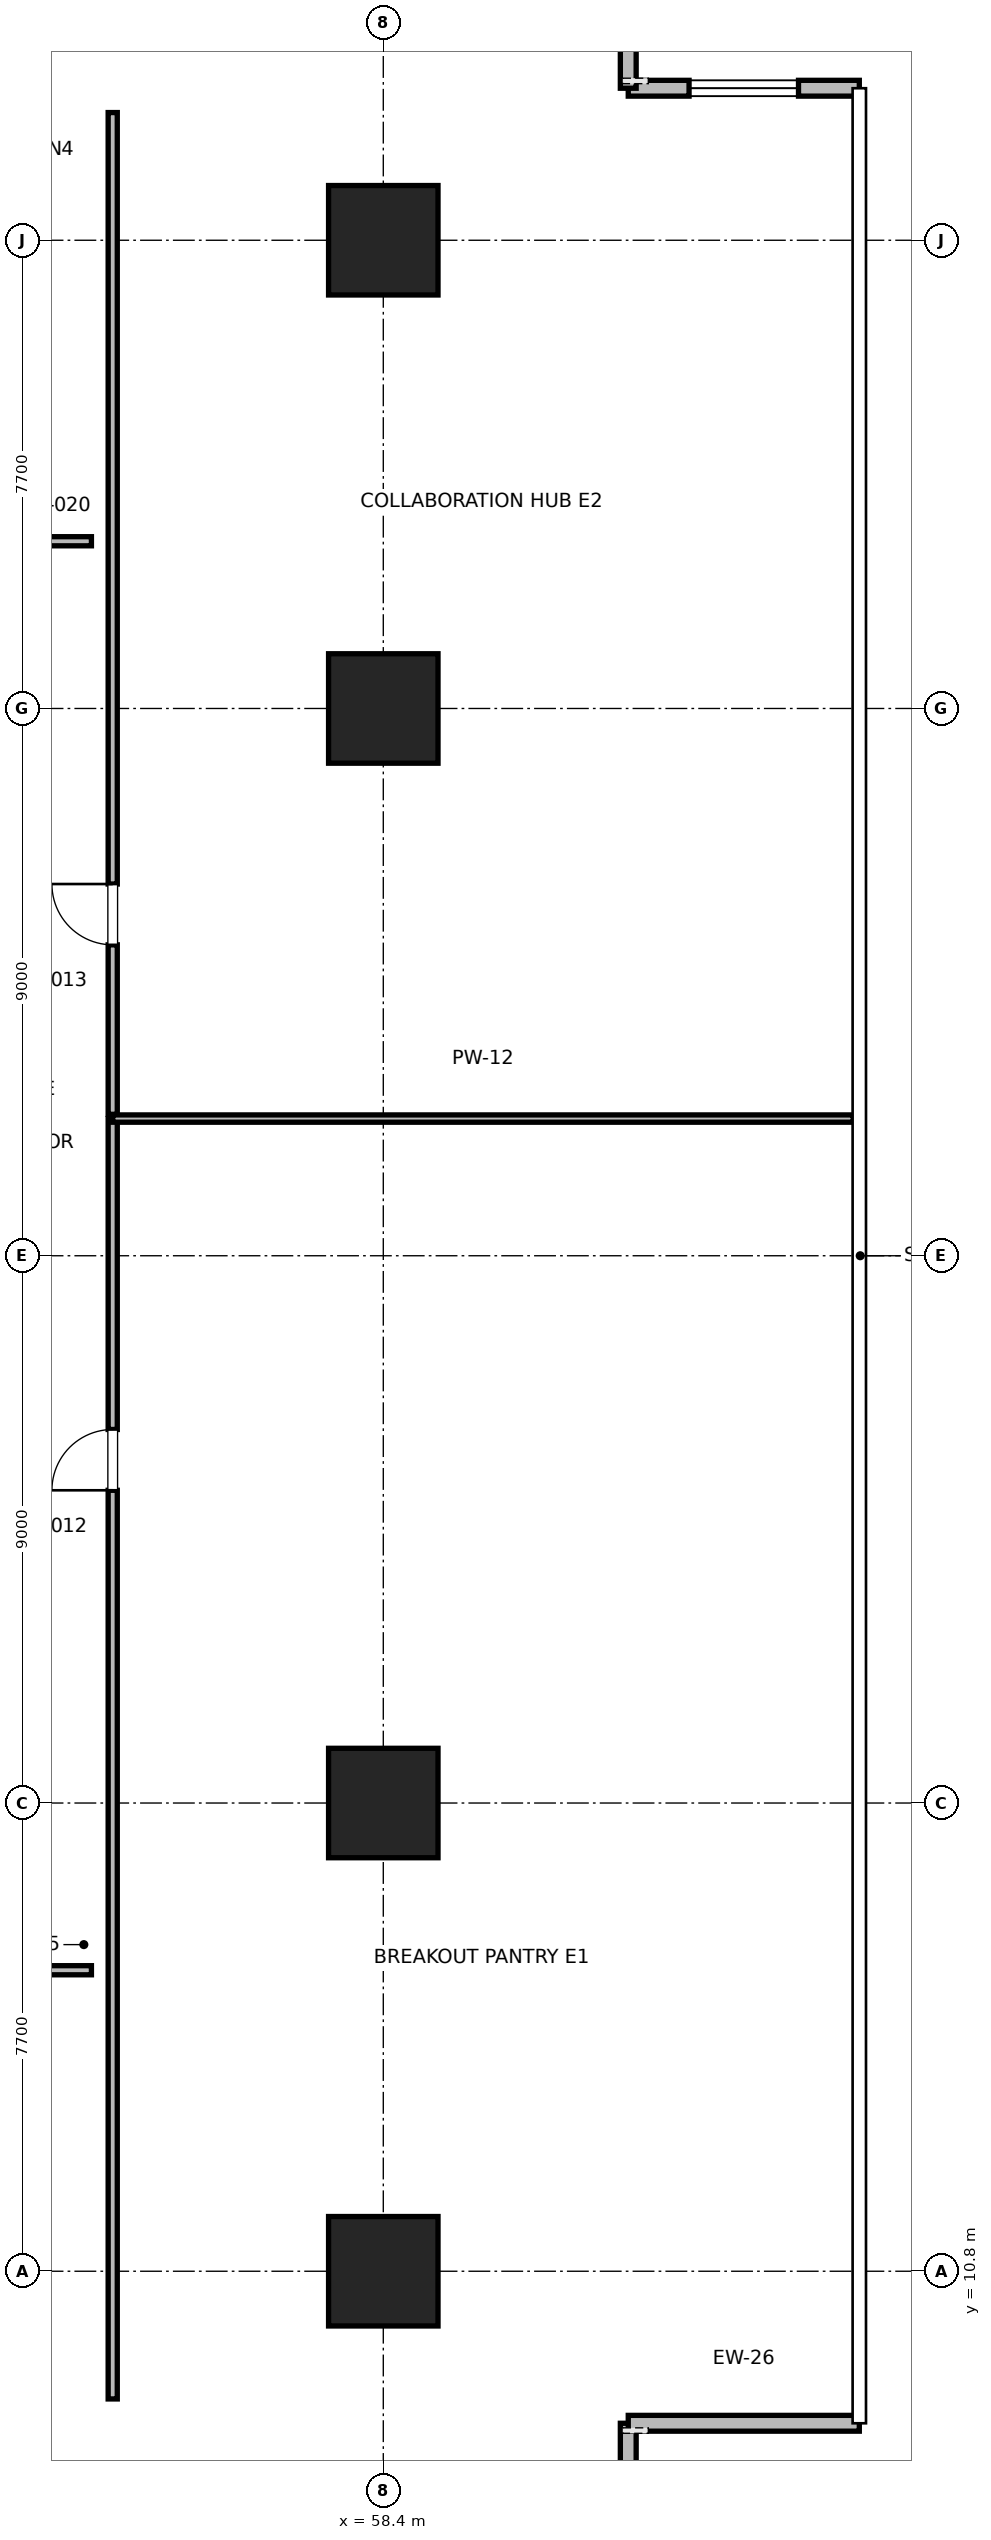
"""IFC4 building model, lengths in metres.
Left out: names, types, materials, properties, quantities, classifications, styles, units other than length and angle.
Written with IfcOpenShell. Run it as: python <this file> out.ifc"""

import sys

from ifc_helpers import new_model, si_unit, direction, frame, frame_2d, origin, origin_2d, place, context, subcontext, project, spatial, rectangle, extrude, element, fill, save


model = new_model("IFC4")
c1 = context("Model", 3, precision=1e-05, world=origin(), true_north=direction((0.0, 1.0)))
c2 = subcontext(c1, "Body", "Model", "MODEL_VIEW")
j1 = project(units=[si_unit("LENGTHUNIT", "METRE"), si_unit("PLANEANGLEUNIT", "RADIAN")], contexts=[c1])
p1 = place(None, origin())
s1 = spatial("IfcSite", under=j1, at=p1, CompositionType="ELEMENT")
p2 = place(p1, origin())
s2 = spatial("IfcBuilding", under=s1, at=p2, CompositionType="ELEMENT")
p3 = place(p2, frame((0.0, 0.0, 79.6)))
s3 = spatial("IfcBuildingStorey", under=s2, at=p3, CompositionType="ELEMENT", Elevation=79.6)
for number, where, z_axis, x_axis in (
    (1, (58.4, 18.5, 0.0), (0.0, 0.0, 1.0), (1.0, 0.0, 0.0)),
    (2, (58.4, 36.5, 0.0), (0.0, 0.0, 1.0), (1.0, 0.0, 0.0)),
    (3, (58.4, 10.8, 0.0), (0.0, 0.0, 1.0), (1.0, 0.0, 0.0)),
    (4, (58.4, 44.2, 0.0), (0.0, 0.0, 1.0), (1.0, 0.0, 0.0)),
):
    element("IfcColumn", number, at=place(p3, frame(where, z_axis=z_axis, x_axis=x_axis)), inside=s3, PredefinedType="COLUMN", context=c2, shape_type="SweptSolid", body=[
        extrude(rectangle(XDim=1.8, YDim=1.8, at=origin_2d()), origin(), (0.0, 0.0, 1.0), 4.0),
    ])
p4 = place(p3, frame((62.429, 4.9, 0.0), z_axis=(0.0, 0.0, 1.0), x_axis=(0.0, 1.0, 0.0)))
e5 = element("IfcWall", 5, at=p4, inside=s3, PredefinedType="PARAPET", context=c2, shape_type="SweptSolid", body=[
    extrude(rectangle(XDim=3.4, YDim=0.26, at=frame_2d((1.7, 0.0))), origin(), (0.0, 0.0, 1.0), 3.76),
])
p5 = place(p4, frame((0.8, 0.0, 0.85)))
e6 = element("IfcOpeningElement", 6, at=p5, cuts=e5, PredefinedType="OPENING", context=c2, shape_type="SweptSolid", body=[
    extrude(rectangle(XDim=1.8, YDim=2.2, at=frame_2d((0.9, 1.1))), frame((0.0, 0.13, 0.0), z_axis=(0.0, -1.0, 0.0), x_axis=(1.0, 0.0, 0.0)), (0.0, 0.0, 1.0), 0.26),
])
p6 = place(p3, frame((62.429, 8.3, 0.0), z_axis=(0.0, 0.0, 1.0), x_axis=(1.0, 0.0, 0.0)))
e7 = element("IfcWall", 7, at=p6, inside=s3, PredefinedType="PARAPET", context=c2, shape_type="SweptSolid", body=[
    extrude(rectangle(XDim=3.8, YDim=0.26, at=frame_2d((1.9, 0.0))), origin(), (0.0, 0.0, 1.0), 3.76),
])
p7 = place(p3, frame((66.229, 46.7, 0.0), z_axis=(0.0, 0.0, 1.0), x_axis=(-1.0, 0.0, 0.0)))
e8 = element("IfcWall", 8, at=p7, inside=s3, PredefinedType="PARAPET", context=c2, shape_type="SweptSolid", body=[
    extrude(rectangle(XDim=3.8, YDim=0.26, at=frame_2d((1.9, 0.0))), origin(), (0.0, 0.0, 1.0), 3.76),
])
p8 = place(p7, frame((1.0, 0.0, 0.85)))
e9 = element("IfcOpeningElement", 9, at=p8, cuts=e8, PredefinedType="OPENING", context=c2, shape_type="SweptSolid", body=[
    extrude(rectangle(XDim=1.8, YDim=2.2, at=frame_2d((0.9, 1.1))), frame((0.0, 0.13, 0.0), z_axis=(0.0, -1.0, 0.0), x_axis=(1.0, 0.0, 0.0)), (0.0, 0.0, 1.0), 0.26),
])
p9 = place(p3, frame((62.429, 46.7, 0.0), z_axis=(0.0, 0.0, 1.0), x_axis=(0.0, 1.0, 0.0)))
e10 = element("IfcWall", 10, at=p9, inside=s3, PredefinedType="PARAPET", context=c2, shape_type="SweptSolid", body=[
    extrude(rectangle(XDim=3.4, YDim=0.26, at=frame_2d((1.7, 0.0))), origin(), (0.0, 0.0, 1.0), 3.76),
])
p10 = place(p3, frame((47.686, 39.25, 0.0), z_axis=(0.0, 0.0, 1.0), x_axis=(1.0, 0.0, 0.0)))
e11 = element("IfcWall", 11, at=p10, inside=s3, PredefinedType="PARTITIONING", context=c2, shape_type="SweptSolid", body=[
    extrude(rectangle(XDim=5.914, YDim=0.15, at=frame_2d((2.957, 0.0))), origin(), (0.0, 0.0, 1.0), 2.85),
])
p11 = place(p10, frame((2.407, 0.0, 0.0)))
e12 = element("IfcOpeningElement", 12, at=p11, cuts=e11, PredefinedType="OPENING", context=c2, shape_type="SweptSolid", body=[
    extrude(rectangle(XDim=1.0, YDim=2.15, at=frame_2d((0.5, 1.075))), frame((0.0, 0.075, 0.0), z_axis=(0.0, -1.0, 0.0), x_axis=(1.0, 0.0, 0.0)), (0.0, 0.0, 1.0), 0.15),
])
p12 = place(p3, frame((47.958, 15.75, 0.0), z_axis=(0.0, 0.0, 1.0), x_axis=(1.0, 0.0, 0.0)))
e13 = element("IfcWall", 13, at=p12, inside=s3, PredefinedType="PARTITIONING", context=c2, shape_type="SweptSolid", body=[
    extrude(rectangle(XDim=5.642, YDim=0.15, at=frame_2d((2.821, 0.0))), origin(), (0.0, 0.0, 1.0), 2.85),
])
p13 = place(p12, frame((2.271, 0.0, 0.0)))
e14 = element("IfcOpeningElement", 14, at=p13, cuts=e13, PredefinedType="OPENING", context=c2, shape_type="SweptSolid", body=[
    extrude(rectangle(XDim=1.0, YDim=2.15, at=frame_2d((0.5, 1.075))), frame((0.0, 0.075, 0.0), z_axis=(0.0, -1.0, 0.0), x_axis=(1.0, 0.0, 0.0)), (0.0, 0.0, 1.0), 0.15),
])
p14 = place(p3, frame((53.95, 8.7, 0.0), z_axis=(0.0, 0.0, 1.0), x_axis=(0.0, 1.0, 0.0)))
e15 = element("IfcWall", 15, at=p14, inside=s3, PredefinedType="PARTITIONING", context=c2, shape_type="SweptSolid", body=[
    extrude(rectangle(XDim=21.056, YDim=0.15, at=frame_2d((10.528, 0.0))), origin(), (0.0, 0.0, 1.0), 2.85),
])
p15 = place(p14, frame((14.943, 0.0, 0.0)))
e16 = element("IfcOpeningElement", 16, at=p15, cuts=e15, PredefinedType="OPENING", context=c2, shape_type="SweptSolid", body=[
    extrude(rectangle(XDim=1.0, YDim=2.15, at=frame_2d((0.5, 1.075))), frame((0.0, 0.075, 0.0), z_axis=(0.0, -1.0, 0.0), x_axis=(1.0, 0.0, 0.0)), (0.0, 0.0, 1.0), 0.15),
])
p16 = place(p3, frame((53.95, 29.756, 0.0), z_axis=(0.0, 0.0, 1.0), x_axis=(1.0, 0.0, 0.0)))
e17 = element("IfcWall", 17, at=p16, inside=s3, PredefinedType="PARTITIONING", context=c2, shape_type="SweptSolid", body=[
    extrude(rectangle(XDim=12.179, YDim=0.12, at=frame_2d((6.089, 0.0))), origin(), (0.0, 0.0, 1.0), 2.85),
])
p17 = place(p3, frame((53.95, 29.826, 0.0), z_axis=(0.0, 0.0, 1.0), x_axis=(0.0, 1.0, 0.0)))
e18 = element("IfcWall", 18, at=p17, inside=s3, PredefinedType="PARTITIONING", context=c2, shape_type="SweptSolid", body=[
    extrude(rectangle(XDim=16.474, YDim=0.15, at=frame_2d((8.237, 0.0))), origin(), (0.0, 0.0, 1.0), 2.85),
])
p18 = place(p17, frame((2.787, 0.0, 0.0)))
e19 = element("IfcOpeningElement", 19, at=p18, cuts=e18, PredefinedType="OPENING", context=c2, shape_type="SweptSolid", body=[
    extrude(rectangle(XDim=1.0, YDim=2.15, at=frame_2d((0.5, 1.075))), frame((0.0, 0.075, 0.0), z_axis=(0.0, -1.0, 0.0), x_axis=(1.0, 0.0, 0.0)), (0.0, 0.0, 1.0), 0.15),
])
p19 = place(p8, origin())
e20 = element("IfcWindow", 20, at=p19, inside=s3, PartitioningType="SINGLE_PANEL", PredefinedType="WINDOW", context=c2, shape_type="SweptSolid", body=[
    extrude(rectangle(XDim=1.8, YDim=2.2, at=frame_2d((0.9, 1.1))), frame((0.0, 0.03, 0.0), z_axis=(0.0, -1.0, 0.0), x_axis=(1.0, 0.0, 0.0)), (0.0, 0.0, 1.0), 0.06),
])
fill(e9, e20)
p20 = place(p15, origin())
e21 = element("IfcDoor", 21, at=p20, inside=s3, OperationType="SINGLE_SWING_LEFT", PredefinedType="DOOR", context=c2, shape_type="SweptSolid", body=[
    extrude(rectangle(XDim=1.0, YDim=2.15, at=frame_2d((0.5, 1.075))), frame((0.0, 0.025, 0.0), z_axis=(0.0, -1.0, 0.0), x_axis=(1.0, 0.0, 0.0)), (0.0, 0.0, 1.0), 0.05),
])
fill(e16, e21)
p21 = place(p18, origin())
e22 = element("IfcDoor", 22, at=p21, inside=s3, OperationType="SINGLE_SWING_RIGHT", PredefinedType="DOOR", context=c2, shape_type="SweptSolid", body=[
    extrude(rectangle(XDim=1.0, YDim=2.15, at=frame_2d((0.5, 1.075))), frame((0.0, 0.025, 0.0), z_axis=(0.0, -1.0, 0.0), x_axis=(1.0, 0.0, 0.0)), (0.0, 0.0, 1.0), 0.05),
])
fill(e19, e22)
save(model, sys.argv[1])
